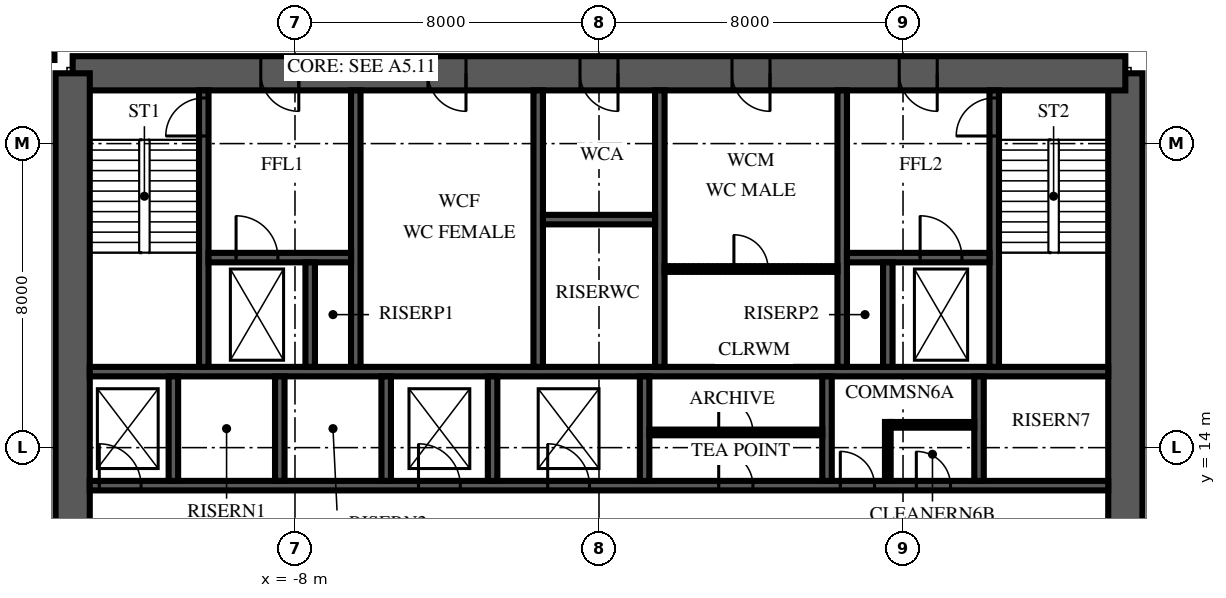
"""IFC4 building model, lengths in metres.
Left out: names, types, materials, properties, quantities, classifications, styles, units other than length and angle.
Written with IfcOpenShell. Run it as: python <this file> out.ifc"""

import sys

from ifc_helpers import new_model, si_unit, direction, frame, frame_2d, origin, place, context, subcontext, project, spatial, polyline, rectangle, outline, extrude, element, fill, save


model = new_model("IFC4")
c1 = context("Model", 3, precision=1e-05, world=origin(), true_north=direction((0.0, 1.0)))
c2 = subcontext(c1, "Body", "Model", "MODEL_VIEW")
j1 = project(units=[si_unit("LENGTHUNIT", "METRE"), si_unit("PLANEANGLEUNIT", "RADIAN")], contexts=[c1])
p1 = place(None, origin())
s1 = spatial("IfcSite", under=j1, at=p1, CompositionType="ELEMENT")
p2 = place(p1, origin())
s2 = spatial("IfcBuilding", under=s1, at=p2, CompositionType="ELEMENT")
p3 = place(p2, frame((0.0, 0.0, 60.0)))
s3 = spatial("IfcBuildingStorey", under=s2, at=p3, CompositionType="ELEMENT", Elevation=60.0)
p4 = place(p3, frame((13.85, 6.15, 0.0), z_axis=(0.0, 0.0, 1.0), x_axis=(0.0, 1.0, 0.0)))
e1 = element("IfcWall", 1, at=p4, inside=s3, PredefinedType="SHEAR", context=c2, shape_type="SweptSolid", body=[
    extrude(outline(polyline([(0.0, -0.45), (17.7, -0.45), (17.7, 0.0), (17.25, 0.0), (17.25, 0.45), (0.45, 0.45), (0.45, 0.0), (0.0, 0.0), (0.0, -0.45)])), origin(), (0.0, 0.0, 1.0), 4.0),
])
p5 = place(p4, frame((4.15, 0.0, 0.0)))
e2 = element("IfcOpeningElement", 2, at=p5, cuts=e1, PredefinedType="OPENING", context=c2, shape_type="SweptSolid", body=[
    extrude(rectangle(XDim=1.8, YDim=2.4, at=frame_2d((0.9, 1.2))), frame((0.0, 0.465, 0.0), z_axis=(0.0, -1.0, 0.0), x_axis=(1.0, 0.0, 0.0)), (0.0, 0.0, 1.0), 0.93),
])
p6 = place(p3, frame((13.85, 23.85, 0.0), z_axis=(0.0, 0.0, 1.0), x_axis=(-1.0, 0.0, 0.0)))
e3 = element("IfcWall", 3, at=p6, inside=s3, PredefinedType="SHEAR", context=c2, shape_type="SweptSolid", body=[
    extrude(rectangle(XDim=27.7, YDim=0.9, at=frame_2d((13.85, 0.0))), origin(), (0.0, 0.0, 1.0), 4.0),
])
p7 = place(p6, frame((21.75, 0.0, 0.0)))
e4 = element("IfcOpeningElement", 4, at=p7, cuts=e3, PredefinedType="OPENING", context=c2, shape_type="SweptSolid", body=[
    extrude(rectangle(XDim=1.0, YDim=2.1, at=frame_2d((0.5, 1.05))), frame((0.0, 0.465, 0.0), z_axis=(0.0, -1.0, 0.0), x_axis=(1.0, 0.0, 0.0)), (0.0, 0.0, 1.0), 0.93),
])
p8 = place(p6, frame((4.95, 0.0, 0.0)))
e5 = element("IfcOpeningElement", 5, at=p8, cuts=e3, PredefinedType="OPENING", context=c2, shape_type="SweptSolid", body=[
    extrude(rectangle(XDim=1.0, YDim=2.1, at=frame_2d((0.5, 1.05))), frame((0.0, 0.465, 0.0), z_axis=(0.0, -1.0, 0.0), x_axis=(1.0, 0.0, 0.0)), (0.0, 0.0, 1.0), 0.93),
])
p9 = place(p6, frame((17.35, 0.0, 0.0)))
e6 = element("IfcOpeningElement", 6, at=p9, cuts=e3, PredefinedType="OPENING", context=c2, shape_type="SweptSolid", body=[
    extrude(rectangle(XDim=1.0, YDim=2.1, at=frame_2d((0.5, 1.05))), frame((0.0, 0.465, 0.0), z_axis=(0.0, -1.0, 0.0), x_axis=(1.0, 0.0, 0.0)), (0.0, 0.0, 1.0), 0.93),
])
p10 = place(p6, frame((13.35, 0.0, 0.0)))
e7 = element("IfcOpeningElement", 7, at=p10, cuts=e3, PredefinedType="OPENING", context=c2, shape_type="SweptSolid", body=[
    extrude(rectangle(XDim=1.0, YDim=2.1, at=frame_2d((0.5, 1.05))), frame((0.0, 0.465, 0.0), z_axis=(0.0, -1.0, 0.0), x_axis=(1.0, 0.0, 0.0)), (0.0, 0.0, 1.0), 0.93),
])
p11 = place(p6, frame((9.35, 0.0, 0.0)))
e8 = element("IfcOpeningElement", 8, at=p11, cuts=e3, PredefinedType="OPENING", context=c2, shape_type="SweptSolid", body=[
    extrude(rectangle(XDim=1.0, YDim=2.1, at=frame_2d((0.5, 1.05))), frame((0.0, 0.465, 0.0), z_axis=(0.0, -1.0, 0.0), x_axis=(1.0, 0.0, 0.0)), (0.0, 0.0, 1.0), 0.93),
])
p12 = place(p3, frame((-13.85, 23.85, 0.0), z_axis=(0.0, 0.0, 1.0), x_axis=(0.0, -1.0, 0.0)))
e9 = element("IfcWall", 9, at=p12, inside=s3, PredefinedType="SHEAR", context=c2, shape_type="SweptSolid", body=[
    extrude(outline(polyline([(0.0, -0.45), (17.7, -0.45), (17.7, 0.0), (17.25, 0.0), (17.25, 0.45), (0.45, 0.45), (0.45, 0.0), (0.0, 0.0), (0.0, -0.45)])), origin(), (0.0, 0.0, 1.0), 4.0),
])
p13 = place(p12, frame((11.75, 0.0, 0.0)))
e10 = element("IfcOpeningElement", 10, at=p13, cuts=e9, PredefinedType="OPENING", context=c2, shape_type="SweptSolid", body=[
    extrude(rectangle(XDim=1.8, YDim=2.4, at=frame_2d((0.9, 1.2))), frame((0.0, 0.465, 0.0), z_axis=(0.0, -1.0, 0.0), x_axis=(1.0, 0.0, 0.0)), (0.0, 0.0, 1.0), 0.93),
])
p14 = place(p3, frame((-13.4, 13.0, 0.0), z_axis=(0.0, 0.0, 1.0), x_axis=(1.0, 0.0, 0.0)))
e11 = element("IfcWall", 11, at=p14, inside=s3, PredefinedType="SHEAR", context=c2, shape_type="SweptSolid", body=[
    extrude(rectangle(XDim=26.8, YDim=0.25, at=frame_2d((13.4, 0.0))), origin(), (0.0, 0.0, 1.0), 4.0),
])
p15 = place(p14, frame((0.25, 0.0, 0.0)))
e12 = element("IfcOpeningElement", 12, at=p15, cuts=e11, PredefinedType="OPENING", context=c2, shape_type="SweptSolid", body=[
    extrude(rectangle(XDim=1.1, YDim=2.1, at=frame_2d((0.55, 1.05))), frame((0.0, 0.14, 0.0), z_axis=(0.0, -1.0, 0.0), x_axis=(1.0, 0.0, 0.0)), (0.0, 0.0, 1.0), 0.28),
])
p16 = place(p14, frame((8.65, 0.0, 0.0)))
e13 = element("IfcOpeningElement", 13, at=p16, cuts=e11, PredefinedType="OPENING", context=c2, shape_type="SweptSolid", body=[
    extrude(rectangle(XDim=1.1, YDim=2.1, at=frame_2d((0.55, 1.05))), frame((0.0, 0.14, 0.0), z_axis=(0.0, -1.0, 0.0), x_axis=(1.0, 0.0, 0.0)), (0.0, 0.0, 1.0), 0.28),
])
p17 = place(p14, frame((12.05, 0.0, 0.0)))
e14 = element("IfcOpeningElement", 14, at=p17, cuts=e11, PredefinedType="OPENING", context=c2, shape_type="SweptSolid", body=[
    extrude(rectangle(XDim=1.1, YDim=2.1, at=frame_2d((0.55, 1.05))), frame((0.0, 0.14, 0.0), z_axis=(0.0, -1.0, 0.0), x_axis=(1.0, 0.0, 0.0)), (0.0, 0.0, 1.0), 0.28),
])
p18 = place(p14, frame((16.55, 0.0, 0.0)))
e15 = element("IfcOpeningElement", 15, at=p18, cuts=e11, PredefinedType="OPENING", context=c2, shape_type="SweptSolid", body=[
    extrude(rectangle(XDim=0.9, YDim=2.1, at=frame_2d((0.45, 1.05))), frame((0.0, 0.14, 0.0), z_axis=(0.0, -1.0, 0.0), x_axis=(1.0, 0.0, 0.0)), (0.0, 0.0, 1.0), 0.28),
])
p19 = place(p14, frame((19.75, 0.0, 0.0)))
e16 = element("IfcOpeningElement", 16, at=p19, cuts=e11, PredefinedType="OPENING", context=c2, shape_type="SweptSolid", body=[
    extrude(rectangle(XDim=0.9, YDim=2.1, at=frame_2d((0.45, 1.05))), frame((0.0, 0.14, 0.0), z_axis=(0.0, -1.0, 0.0), x_axis=(1.0, 0.0, 0.0)), (0.0, 0.0, 1.0), 0.28),
])
p20 = place(p14, frame((21.75, 0.0, 0.0)))
e17 = element("IfcOpeningElement", 17, at=p20, cuts=e11, PredefinedType="OPENING", context=c2, shape_type="SweptSolid", body=[
    extrude(rectangle(XDim=0.9, YDim=2.1, at=frame_2d((0.45, 1.05))), frame((0.0, 0.14, 0.0), z_axis=(0.0, -1.0, 0.0), x_axis=(1.0, 0.0, 0.0)), (0.0, 0.0, 1.0), 0.28),
])
p21 = place(p3, frame((-13.4, 16.0, 0.0), z_axis=(0.0, 0.0, 1.0), x_axis=(1.0, 0.0, 0.0)))
e18 = element("IfcWall", 18, at=p21, inside=s3, PredefinedType="SHEAR", context=c2, shape_type="SweptSolid", body=[
    extrude(rectangle(XDim=26.8, YDim=0.25, at=frame_2d((13.4, 0.0))), origin(), (0.0, 0.0, 1.0), 4.0),
])
for number, where, z_axis, x_axis in (
    (19, (-11.2, 13.125, 0.0), (0.0, 0.0, 1.0), (0.0, 1.0, 0.0)),
    (20, (-8.4, 13.125, 0.0), (0.0, 0.0, 1.0), (0.0, 1.0, 0.0)),
    (21, (-5.6, 13.125, 0.0), (0.0, 0.0, 1.0), (0.0, 1.0, 0.0)),
    (22, (-2.8, 13.125, 0.0), (0.0, 0.0, 1.0), (0.0, 1.0, 0.0)),
    (23, (1.2, 13.125, 0.0), (0.0, 0.0, 1.0), (0.0, 1.0, 0.0)),
    (24, (6.0, 13.125, 0.0), (0.0, 0.0, 1.0), (0.0, 1.0, 0.0)),
    (25, (10.0, 13.125, 0.0), (0.0, 0.0, 1.0), (0.0, 1.0, 0.0)),
):
    element("IfcWall", number, at=place(p3, frame(where, z_axis=z_axis, x_axis=x_axis)), inside=s3, PredefinedType="SHEAR", context=c2, shape_type="SweptSolid", body=[
        extrude(rectangle(XDim=2.75, YDim=0.25, at=frame_2d((1.375, 0.0))), origin(), (0.0, 0.0, 1.0), 4.0),
    ])
p22 = place(p3, frame((-10.4, 16.125, 0.0), z_axis=(0.0, 0.0, 1.0), x_axis=(0.0, 1.0, 0.0)))
e26 = element("IfcWall", 26, at=p22, inside=s3, PredefinedType="SHEAR", context=c2, shape_type="SweptSolid", body=[
    extrude(rectangle(XDim=7.275, YDim=0.25, at=frame_2d((3.637, 0.0))), origin(), (0.0, 0.0, 1.0), 4.0),
])
p23 = place(p22, frame((6.075, 0.0, 0.0)))
e27 = element("IfcOpeningElement", 27, at=p23, cuts=e26, PredefinedType="OPENING", context=c2, shape_type="SweptSolid", body=[
    extrude(rectangle(XDim=1.0, YDim=2.1, at=frame_2d((0.5, 1.05))), frame((0.0, 0.14, 0.0), z_axis=(0.0, -1.0, 0.0), x_axis=(1.0, 0.0, 0.0)), (0.0, 0.0, 1.0), 0.28),
])
for number, where, z_axis, x_axis in (
    (28, (-6.4, 16.125, 0.0), (0.0, 0.0, 1.0), (0.0, 1.0, 0.0)),
    (29, (-1.6, 16.125, 0.0), (0.0, 0.0, 1.0), (0.0, 1.0, 0.0)),
    (30, (1.6, 16.125, 0.0), (0.0, 0.0, 1.0), (0.0, 1.0, 0.0)),
    (31, (6.4, 16.125, 0.0), (0.0, 0.0, 1.0), (0.0, 1.0, 0.0)),
):
    element("IfcWall", number, at=place(p3, frame(where, z_axis=z_axis, x_axis=x_axis)), inside=s3, PredefinedType="SHEAR", context=c2, shape_type="SweptSolid", body=[
        extrude(rectangle(XDim=7.275, YDim=0.25, at=frame_2d((3.637, 0.0))), origin(), (0.0, 0.0, 1.0), 4.0),
    ])
p24 = place(p3, frame((10.4, 16.125, 0.0), z_axis=(0.0, 0.0, 1.0), x_axis=(0.0, 1.0, 0.0)))
e32 = element("IfcWall", 32, at=p24, inside=s3, PredefinedType="SHEAR", context=c2, shape_type="SweptSolid", body=[
    extrude(rectangle(XDim=7.275, YDim=0.25, at=frame_2d((3.637, 0.0))), origin(), (0.0, 0.0, 1.0), 4.0),
])
p25 = place(p24, frame((6.075, 0.0, 0.0)))
e33 = element("IfcOpeningElement", 33, at=p25, cuts=e32, PredefinedType="OPENING", context=c2, shape_type="SweptSolid", body=[
    extrude(rectangle(XDim=1.0, YDim=2.1, at=frame_2d((0.5, 1.05))), frame((0.0, 0.14, 0.0), z_axis=(0.0, -1.0, 0.0), x_axis=(1.0, 0.0, 0.0)), (0.0, 0.0, 1.0), 0.28),
])
p26 = place(p3, frame((-10.275, 19.0, 0.0), z_axis=(0.0, 0.0, 1.0), x_axis=(1.0, 0.0, 0.0)))
e34 = element("IfcWall", 34, at=p26, inside=s3, PredefinedType="SHEAR", context=c2, shape_type="SweptSolid", body=[
    extrude(rectangle(XDim=3.75, YDim=0.25, at=frame_2d((1.875, 0.0))), origin(), (0.0, 0.0, 1.0), 4.0),
])
p27 = place(p26, frame((0.725, 0.0, 0.0)))
e35 = element("IfcOpeningElement", 35, at=p27, cuts=e34, PredefinedType="OPENING", context=c2, shape_type="SweptSolid", body=[
    extrude(rectangle(XDim=1.1, YDim=2.1, at=frame_2d((0.55, 1.05))), frame((0.0, 0.14, 0.0), z_axis=(0.0, -1.0, 0.0), x_axis=(1.0, 0.0, 0.0)), (0.0, 0.0, 1.0), 0.28),
])
p28 = place(p3, frame((6.525, 19.0, 0.0), z_axis=(0.0, 0.0, 1.0), x_axis=(1.0, 0.0, 0.0)))
e36 = element("IfcWall", 36, at=p28, inside=s3, PredefinedType="SHEAR", context=c2, shape_type="SweptSolid", body=[
    extrude(rectangle(XDim=3.75, YDim=0.25, at=frame_2d((1.875, 0.0))), origin(), (0.0, 0.0, 1.0), 4.0),
])
p29 = place(p28, frame((1.925, 0.0, 0.0)))
e37 = element("IfcOpeningElement", 37, at=p29, cuts=e36, PredefinedType="OPENING", context=c2, shape_type="SweptSolid", body=[
    extrude(rectangle(XDim=1.1, YDim=2.1, at=frame_2d((0.55, 1.05))), frame((0.0, 0.14, 0.0), z_axis=(0.0, -1.0, 0.0), x_axis=(1.0, 0.0, 0.0)), (0.0, 0.0, 1.0), 0.28),
])
for number, where, z_axis, x_axis in (
    (38, (-7.6, 16.125, 0.0), (0.0, 0.0, 1.0), (0.0, 1.0, 0.0)),
    (39, (7.6, 16.125, 0.0), (0.0, 0.0, 1.0), (0.0, 1.0, 0.0)),
):
    element("IfcWall", number, at=place(p3, frame(where, z_axis=z_axis, x_axis=x_axis)), inside=s3, PredefinedType="SHEAR", context=c2, shape_type="SweptSolid", body=[
        extrude(rectangle(XDim=2.75, YDim=0.25, at=frame_2d((1.375, 0.0))), origin(), (0.0, 0.0, 1.0), 4.0),
    ])
p30 = place(p3, frame((-1.475, 20.0, 0.0), z_axis=(0.0, 0.0, 1.0), x_axis=(1.0, 0.0, 0.0)))
e40 = element("IfcWall", 40, at=p30, inside=s3, PredefinedType="SHEAR", context=c2, shape_type="SweptSolid", body=[
    extrude(rectangle(XDim=2.95, YDim=0.25, at=frame_2d((1.475, 0.0))), origin(), (0.0, 0.0, 1.0), 4.0),
])
p31 = place(p3, frame((1.725, 18.7, 0.0), z_axis=(0.0, 0.0, 1.0), x_axis=(1.0, 0.0, 0.0)))
e41 = element("IfcWall", 41, at=p31, inside=s3, PredefinedType="PARTITIONING", context=c2, shape_type="SweptSolid", body=[
    extrude(rectangle(XDim=4.55, YDim=0.15, at=frame_2d((2.275, 0.0))), origin(), (0.0, 0.0, 1.0), 3.85),
])
p32 = place(p31, frame((1.825, 0.0, 0.0)))
e42 = element("IfcOpeningElement", 42, at=p32, cuts=e41, PredefinedType="OPENING", context=c2, shape_type="SweptSolid", body=[
    extrude(rectangle(XDim=0.9, YDim=2.1, at=frame_2d((0.45, 1.05))), frame((0.0, 0.09, 0.0), z_axis=(0.0, -1.0, 0.0), x_axis=(1.0, 0.0, 0.0)), (0.0, 0.0, 1.0), 0.18),
])
p33 = place(p3, frame((1.325, 14.4, 0.0), z_axis=(0.0, 0.0, 1.0), x_axis=(1.0, 0.0, 0.0)))
e43 = element("IfcWall", 43, at=p33, inside=s3, PredefinedType="PARTITIONING", context=c2, shape_type="SweptSolid", body=[
    extrude(rectangle(XDim=4.55, YDim=0.15, at=frame_2d((2.275, 0.0))), origin(), (0.0, 0.0, 1.0), 3.85),
])
p34 = place(p33, frame((1.825, 0.0, 0.0)))
e44 = element("IfcOpeningElement", 44, at=p34, cuts=e43, PredefinedType="OPENING", context=c2, shape_type="SweptSolid", body=[
    extrude(rectangle(XDim=0.9, YDim=2.1, at=frame_2d((0.45, 1.05))), frame((0.0, 0.09, 0.0), z_axis=(0.0, -1.0, 0.0), x_axis=(1.0, 0.0, 0.0)), (0.0, 0.0, 1.0), 0.18),
])
p35 = place(p3, frame((7.6, 13.125, 0.0), z_axis=(0.0, 0.0, 1.0), x_axis=(0.0, 1.0, 0.0)))
e45 = element("IfcWall", 45, at=p35, inside=s3, PredefinedType="PARTITIONING", context=c2, shape_type="SweptSolid", body=[
    extrude(rectangle(XDim=1.55, YDim=0.15, at=frame_2d((0.775, 0.0))), origin(), (0.0, 0.0, 1.0), 3.85),
])
p36 = place(p3, frame((7.675, 14.6, 0.0), z_axis=(0.0, 0.0, 1.0), x_axis=(1.0, 0.0, 0.0)))
e46 = element("IfcWall", 46, at=p36, inside=s3, PredefinedType="PARTITIONING", context=c2, shape_type="SweptSolid", body=[
    extrude(rectangle(XDim=2.2, YDim=0.15, at=frame_2d((1.1, 0.0))), origin(), (0.0, 0.0, 1.0), 3.85),
])
p37 = place(p3, frame((-16.35, 24.3, 0.0), z_axis=(0.0, 0.0, 1.0), x_axis=(1.0, 0.0, 0.0)))
e47 = element("IfcWall", 47, at=p37, inside=s3, PredefinedType="PARTITIONING", context=c2, shape_type="SweptSolid", body=[
    extrude(rectangle(XDim=2.02, YDim=0.2, at=frame_2d((1.01, 0.0))), origin(), (0.0, 0.0, 1.0), 3.4),
])
p38 = place(p7, origin())
e48 = element("IfcDoor", 48, at=p38, inside=s3, OperationType="SINGLE_SWING_RIGHT", PredefinedType="DOOR", context=c2, shape_type="SweptSolid", body=[
    extrude(rectangle(XDim=1.0, YDim=2.1, at=frame_2d((0.5, 1.05))), frame((0.0, 0.45, 0.0), z_axis=(0.0, -1.0, 0.0), x_axis=(1.0, 0.0, 0.0)), (0.0, 0.0, 1.0), 0.899),
])
fill(e4, e48)
p39 = place(p8, origin())
e49 = element("IfcDoor", 49, at=p39, inside=s3, OperationType="SINGLE_SWING_RIGHT", PredefinedType="DOOR", context=c2, shape_type="SweptSolid", body=[
    extrude(rectangle(XDim=1.0, YDim=2.1, at=frame_2d((0.5, 1.05))), frame((0.0, 0.45, 0.0), z_axis=(0.0, -1.0, 0.0), x_axis=(1.0, 0.0, 0.0)), (0.0, 0.0, 1.0), 0.899),
])
fill(e5, e49)
p40 = place(p9, origin())
e50 = element("IfcDoor", 50, at=p40, inside=s3, OperationType="SINGLE_SWING_LEFT", PredefinedType="DOOR", context=c2, shape_type="SweptSolid", body=[
    extrude(rectangle(XDim=1.0, YDim=2.1, at=frame_2d((0.5, 1.05))), frame((0.0, 0.45, 0.0), z_axis=(0.0, -1.0, 0.0), x_axis=(1.0, 0.0, 0.0)), (0.0, 0.0, 1.0), 0.899),
])
fill(e6, e50)
p41 = place(p10, origin())
e51 = element("IfcDoor", 51, at=p41, inside=s3, OperationType="SINGLE_SWING_LEFT", PredefinedType="DOOR", context=c2, shape_type="SweptSolid", body=[
    extrude(rectangle(XDim=1.0, YDim=2.1, at=frame_2d((0.5, 1.05))), frame((0.0, 0.45, 0.0), z_axis=(0.0, -1.0, 0.0), x_axis=(1.0, 0.0, 0.0)), (0.0, 0.0, 1.0), 0.899),
])
fill(e7, e51)
p42 = place(p11, origin())
e52 = element("IfcDoor", 52, at=p42, inside=s3, OperationType="SINGLE_SWING_LEFT", PredefinedType="DOOR", context=c2, shape_type="SweptSolid", body=[
    extrude(rectangle(XDim=1.0, YDim=2.1, at=frame_2d((0.5, 1.05))), frame((0.0, 0.45, 0.0), z_axis=(0.0, -1.0, 0.0), x_axis=(1.0, 0.0, 0.0)), (0.0, 0.0, 1.0), 0.899),
])
fill(e8, e52)
p43 = place(p23, origin())
e53 = element("IfcDoor", 53, at=p43, inside=s3, OperationType="SINGLE_SWING_LEFT", PredefinedType="DOOR", context=c2, shape_type="SweptSolid", body=[
    extrude(rectangle(XDim=1.0, YDim=2.1, at=frame_2d((0.5, 1.05))), frame((0.0, 0.125, 0.0), z_axis=(0.0, -1.0, 0.0), x_axis=(1.0, 0.0, 0.0)), (0.0, 0.0, 1.0), 0.25),
])
fill(e27, e53)
p44 = place(p25, origin())
e54 = element("IfcDoor", 54, at=p44, inside=s3, OperationType="SINGLE_SWING_LEFT", PredefinedType="DOOR", context=c2, shape_type="SweptSolid", body=[
    extrude(rectangle(XDim=1.0, YDim=2.1, at=frame_2d((0.5, 1.05))), frame((0.0, 0.125, 0.0), z_axis=(0.0, -1.0, 0.0), x_axis=(1.0, 0.0, 0.0)), (0.0, 0.0, 1.0), 0.25),
])
fill(e33, e54)
p45 = place(p15, origin())
e55 = element("IfcDoor", 55, at=p45, inside=s3, OperationType="SLIDING_TO_LEFT", PredefinedType="DOOR", context=c2, shape_type="SweptSolid", body=[
    extrude(rectangle(XDim=1.1, YDim=2.1, at=frame_2d((0.55, 1.05))), frame((0.0, 0.125, 0.0), z_axis=(0.0, -1.0, 0.0), x_axis=(1.0, 0.0, 0.0)), (0.0, 0.0, 1.0), 0.25),
])
fill(e12, e55)
p46 = place(p16, origin())
e56 = element("IfcDoor", 56, at=p46, inside=s3, OperationType="SLIDING_TO_LEFT", PredefinedType="DOOR", context=c2, shape_type="SweptSolid", body=[
    extrude(rectangle(XDim=1.1, YDim=2.1, at=frame_2d((0.55, 1.05))), frame((0.0, 0.125, 0.0), z_axis=(0.0, -1.0, 0.0), x_axis=(1.0, 0.0, 0.0)), (0.0, 0.0, 1.0), 0.25),
])
fill(e13, e56)
p47 = place(p17, origin())
e57 = element("IfcDoor", 57, at=p47, inside=s3, OperationType="SLIDING_TO_LEFT", PredefinedType="DOOR", context=c2, shape_type="SweptSolid", body=[
    extrude(rectangle(XDim=1.1, YDim=2.1, at=frame_2d((0.55, 1.05))), frame((0.0, 0.125, 0.0), z_axis=(0.0, -1.0, 0.0), x_axis=(1.0, 0.0, 0.0)), (0.0, 0.0, 1.0), 0.25),
])
fill(e14, e57)
p48 = place(p29, origin())
e58 = element("IfcDoor", 58, at=p48, inside=s3, OperationType="SLIDING_TO_RIGHT", PredefinedType="DOOR", context=c2, shape_type="SweptSolid", body=[
    extrude(rectangle(XDim=1.1, YDim=2.1, at=frame_2d((0.55, 1.05))), frame((0.0, 0.125, 0.0), z_axis=(0.0, -1.0, 0.0), x_axis=(1.0, 0.0, 0.0)), (0.0, 0.0, 1.0), 0.25),
])
fill(e37, e58)
p49 = place(p27, origin())
e59 = element("IfcDoor", 59, at=p49, inside=s3, OperationType="SLIDING_TO_RIGHT", PredefinedType="DOOR", context=c2, shape_type="SweptSolid", body=[
    extrude(rectangle(XDim=1.1, YDim=2.1, at=frame_2d((0.55, 1.05))), frame((0.0, 0.125, 0.0), z_axis=(0.0, -1.0, 0.0), x_axis=(1.0, 0.0, 0.0)), (0.0, 0.0, 1.0), 0.25),
])
fill(e35, e59)
p50 = place(p18, origin())
e60 = element("IfcDoor", 60, at=p50, inside=s3, OperationType="SINGLE_SWING_LEFT", PredefinedType="DOOR", context=c2, shape_type="SweptSolid", body=[
    extrude(rectangle(XDim=0.9, YDim=2.1, at=frame_2d((0.45, 1.05))), frame((0.0, 0.125, 0.0), z_axis=(0.0, -1.0, 0.0), x_axis=(1.0, 0.0, 0.0)), (0.0, 0.0, 1.0), 0.25),
])
fill(e15, e60)
p51 = place(p34, origin())
e61 = element("IfcDoor", 61, at=p51, inside=s3, OperationType="SINGLE_SWING_LEFT", PredefinedType="DOOR", context=c2, shape_type="SweptSolid", body=[
    extrude(rectangle(XDim=0.9, YDim=2.1, at=frame_2d((0.45, 1.05))), frame((0.0, 0.075, 0.0), z_axis=(0.0, -1.0, 0.0), x_axis=(1.0, 0.0, 0.0)), (0.0, 0.0, 1.0), 0.149),
])
fill(e44, e61)
p52 = place(p19, origin())
e62 = element("IfcDoor", 62, at=p52, inside=s3, OperationType="SINGLE_SWING_LEFT", PredefinedType="DOOR", context=c2, shape_type="SweptSolid", body=[
    extrude(rectangle(XDim=0.9, YDim=2.1, at=frame_2d((0.45, 1.05))), frame((0.0, 0.125, 0.0), z_axis=(0.0, -1.0, 0.0), x_axis=(1.0, 0.0, 0.0)), (0.0, 0.0, 1.0), 0.25),
])
fill(e16, e62)
p53 = place(p20, origin())
e63 = element("IfcDoor", 63, at=p53, inside=s3, OperationType="SINGLE_SWING_LEFT", PredefinedType="DOOR", context=c2, shape_type="SweptSolid", body=[
    extrude(rectangle(XDim=0.9, YDim=2.1, at=frame_2d((0.45, 1.05))), frame((0.0, 0.125, 0.0), z_axis=(0.0, -1.0, 0.0), x_axis=(1.0, 0.0, 0.0)), (0.0, 0.0, 1.0), 0.25),
])
fill(e17, e63)
p54 = place(p32, origin())
e64 = element("IfcDoor", 64, at=p54, inside=s3, OperationType="SINGLE_SWING_LEFT", PredefinedType="DOOR", context=c2, shape_type="SweptSolid", body=[
    extrude(rectangle(XDim=0.9, YDim=2.1, at=frame_2d((0.45, 1.05))), frame((0.0, 0.075, 0.0), z_axis=(0.0, -1.0, 0.0), x_axis=(1.0, 0.0, 0.0)), (0.0, 0.0, 1.0), 0.149),
])
fill(e42, e64)
save(model, sys.argv[1])
